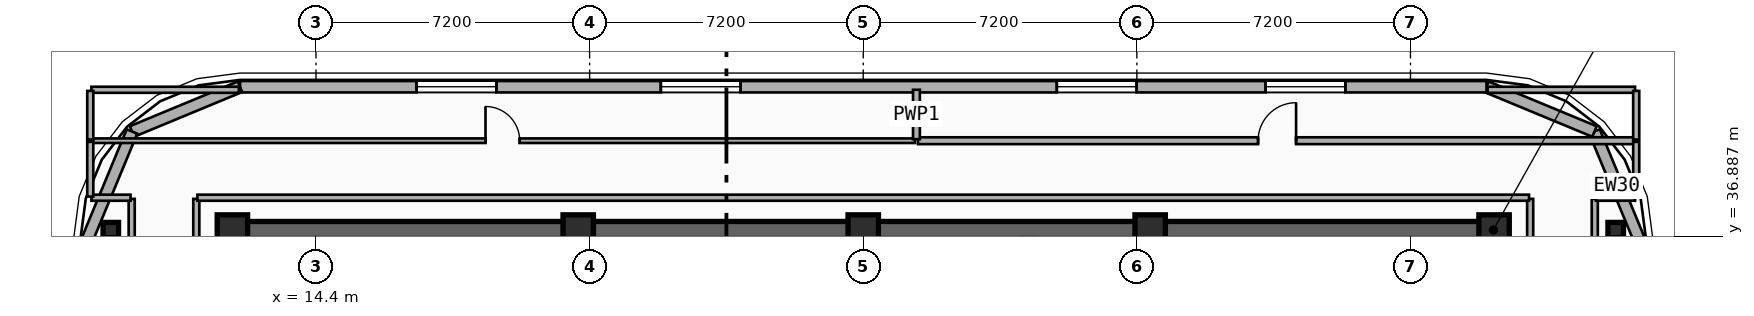
"""IFC4 building model, lengths in metres.
Left out: names, types, materials, properties, quantities, classifications, styles, units other than length and angle.
Written with IfcOpenShell. Run it as: python <this file> out.ifc"""

import sys

from ifc_helpers import new_model, si_unit, direction, frame, frame_2d, origin, origin_2d, place, context, subcontext, project, spatial, rectangle, i_section, extrude, element, fill, save


model = new_model("IFC4")
c1 = context("Model", 3, precision=1e-05, world=origin(), true_north=direction((0.0, 1.0)))
c2 = subcontext(c1, "Body", "Model", "MODEL_VIEW")
j1 = project(units=[si_unit("LENGTHUNIT", "METRE"), si_unit("PLANEANGLEUNIT", "RADIAN")], contexts=[c1])
p1 = place(None, origin())
s1 = spatial("IfcSite", under=j1, at=p1, CompositionType="ELEMENT")
p2 = place(p1, origin())
s2 = spatial("IfcBuilding", under=s1, at=p2, CompositionType="ELEMENT")
p3 = place(p2, frame((0.0, 0.0, 254.7)))
s3 = spatial("IfcBuildingStorey", under=s2, at=p3, CompositionType="ELEMENT", Elevation=254.7)
p4 = place(p3, frame((12.15, 37.05, 0.0), z_axis=(0.0, 0.0, 1.0), x_axis=(1.0, 0.0, 0.0)))
e1 = element("IfcWall", 1, at=p4, inside=s3, PredefinedType="SHEAR", context=c2, shape_type="SweptSolid", body=[
    extrude(rectangle(XDim=33.23, YDim=0.45, at=frame_2d((16.615, 0.0))), origin(), (0.0, 0.0, 1.0), 3.7),
])
for number, where, z_axis, x_axis in (
    (2, (12.2, 37.05, 0.0), (0.0, 0.0, 1.0), (1.0, 0.0, 0.0)),
    (3, (21.3, 37.05, 0.0), (0.0, 0.0, 1.0), (1.0, 0.0, 0.0)),
    (4, (28.8, 37.05, 0.0), (0.0, 0.0, 1.0), (1.0, 0.0, 0.0)),
    (5, (36.35, 37.05, 0.0), (0.0, 0.0, 1.0), (1.0, 0.0, 0.0)),
    (6, (45.4, 37.05, 0.0), (0.0, 0.0, 1.0), (1.0, 0.0, 0.0)),
):
    element("IfcColumn", number, at=place(p3, frame(where, z_axis=z_axis, x_axis=x_axis)), inside=s3, PredefinedType="COLUMN", context=c2, shape_type="SweptSolid", body=[
        extrude(rectangle(XDim=0.8, YDim=0.8, at=origin_2d()), origin(), (0.0, 0.0, 1.0), 3.7),
    ])
for number, where, z_axis, x_axis in (
    (7, (9.0, 37.05, 0.0), (0.0, 0.0, 1.0), (1.0, 0.0, 0.0)),
    (8, (48.6, 37.05, 0.0), (0.0, 0.0, 1.0), (1.0, 0.0, 0.0)),
):
    element("IfcColumn", number, at=place(p3, frame(where, z_axis=z_axis, x_axis=x_axis)), inside=s3, PredefinedType="COLUMN", context=c2, shape_type="SweptSolid", body=[
        extrude(i_section(OverallWidth=0.408, OverallDepth=0.4, WebThickness=0.025, FlangeThickness=0.039, FilletRadius=0.015, at=origin_2d()), origin(), (0.0, 0.0, 1.0), 3.7),
    ])
for number, where, z_axis, x_axis in (
    (9, (48.042, 39.643, 0.0), (0.0, 0.0, 1.0), (0.383, -0.924, 0.0)),
    (10, (45.2, 40.82, 0.0), (0.0, 0.0, 1.0), (0.924, -0.383, 0.0)),
):
    element("IfcWall", number, at=place(p3, frame(where, z_axis=z_axis, x_axis=x_axis)), inside=s3, PredefinedType="SOLIDWALL", context=c2, shape_type="SweptSolid", body=[
        extrude(rectangle(XDim=3.077, YDim=0.3, at=frame_2d((1.538, 0.0))), origin(), (0.0, 0.0, 1.0), 3.42),
    ])
p5 = place(p3, frame((12.4, 40.82, 0.0), z_axis=(0.0, 0.0, 1.0), x_axis=(1.0, 0.0, 0.0)))
e11 = element("IfcWall", 11, at=p5, inside=s3, PredefinedType="SOLIDWALL", context=c2, shape_type="SweptSolid", body=[
    extrude(rectangle(XDim=32.8, YDim=0.3, at=frame_2d((16.4, 0.0))), origin(), (0.0, 0.0, 1.0), 3.42),
])
p6 = place(p5, frame((4.647, 0.0, 0.75)))
e12 = element("IfcOpeningElement", 12, at=p6, cuts=e11, PredefinedType="OPENING", context=c2, shape_type="SweptSolid", body=[
    extrude(rectangle(XDim=2.1, YDim=2.1, at=frame_2d((1.05, 1.05))), frame((0.0, 0.16, 0.0), z_axis=(0.0, -1.0, 0.0), x_axis=(1.0, 0.0, 0.0)), (0.0, 0.0, 1.0), 0.32),
])
p7 = place(p5, frame((11.073, 0.0, 0.75)))
e13 = element("IfcOpeningElement", 13, at=p7, cuts=e11, PredefinedType="OPENING", context=c2, shape_type="SweptSolid", body=[
    extrude(rectangle(XDim=2.1, YDim=2.1, at=frame_2d((1.05, 1.05))), frame((0.0, 0.16, 0.0), z_axis=(0.0, -1.0, 0.0), x_axis=(1.0, 0.0, 0.0)), (0.0, 0.0, 1.0), 0.32),
])
p8 = place(p5, frame((21.493, 0.0, 0.75)))
e14 = element("IfcOpeningElement", 14, at=p8, cuts=e11, PredefinedType="OPENING", context=c2, shape_type="SweptSolid", body=[
    extrude(rectangle(XDim=2.1, YDim=2.1, at=frame_2d((1.05, 1.05))), frame((0.0, 0.16, 0.0), z_axis=(0.0, -1.0, 0.0), x_axis=(1.0, 0.0, 0.0)), (0.0, 0.0, 1.0), 0.32),
])
p9 = place(p5, frame((26.987, 0.0, 0.75)))
e15 = element("IfcOpeningElement", 15, at=p9, cuts=e11, PredefinedType="OPENING", context=c2, shape_type="SweptSolid", body=[
    extrude(rectangle(XDim=2.1, YDim=2.1, at=frame_2d((1.05, 1.05))), frame((0.0, 0.16, 0.0), z_axis=(0.0, -1.0, 0.0), x_axis=(1.0, 0.0, 0.0)), (0.0, 0.0, 1.0), 0.32),
])
for number, where, z_axis, x_axis in (
    (16, (9.557, 39.643, 0.0), (0.0, 0.0, 1.0), (0.924, 0.383, 0.0)),
    (17, (8.38, 36.8, 0.0), (0.0, 0.0, 1.0), (0.383, 0.924, 0.0)),
):
    element("IfcWall", number, at=place(p3, frame(where, z_axis=z_axis, x_axis=x_axis)), inside=s3, PredefinedType="SOLIDWALL", context=c2, shape_type="SweptSolid", body=[
        extrude(rectangle(XDim=3.077, YDim=0.3, at=frame_2d((1.538, 0.0))), origin(), (0.0, 0.0, 1.0), 3.42),
    ])
p10 = place(p3, frame((8.46, 39.4, 0.0), z_axis=(0.0, 0.0, 1.0), x_axis=(1.0, 0.0, 0.0)))
e18 = element("IfcWall", 18, at=p10, inside=s3, PredefinedType="PARTITIONING", context=c2, shape_type="SweptSolid", body=[
    extrude(rectangle(XDim=21.7, YDim=0.12, at=frame_2d((10.85, 0.0))), origin(), (0.0, 0.0, 1.0), 3.42),
])
p11 = place(p10, frame((10.4, 0.0, 0.0)))
e19 = element("IfcOpeningElement", 19, at=p11, cuts=e18, PredefinedType="OPENING", context=c2, shape_type="SweptSolid", body=[
    extrude(rectangle(XDim=0.9, YDim=2.1, at=frame_2d((0.45, 1.05))), frame((0.0, 0.07, 0.0), z_axis=(0.0, -1.0, 0.0), x_axis=(1.0, 0.0, 0.0)), (0.0, 0.0, 1.0), 0.14),
])
p12 = place(p3, frame((30.24, 39.4, 0.0), z_axis=(0.0, 0.0, 1.0), x_axis=(1.0, 0.0, 0.0)))
e20 = element("IfcWall", 20, at=p12, inside=s3, PredefinedType="PLUMBINGWALL", context=c2, shape_type="SweptSolid", body=[
    extrude(rectangle(XDim=18.9, YDim=0.18, at=frame_2d((9.45, 0.0))), origin(), (0.0, 0.0, 1.0), 3.42),
])
p13 = place(p12, frame((8.95, 0.0, 0.0)))
e21 = element("IfcOpeningElement", 21, at=p13, cuts=e20, PredefinedType="OPENING", context=c2, shape_type="SweptSolid", body=[
    extrude(rectangle(XDim=1.0, YDim=2.15, at=frame_2d((0.5, 1.075))), frame((0.0, 0.1, 0.0), z_axis=(0.0, -1.0, 0.0), x_axis=(1.0, 0.0, 0.0)), (0.0, 0.0, 1.0), 0.2),
])
p14 = place(p3, frame((30.2, 39.44, 0.0), z_axis=(0.0, 0.0, 1.0), x_axis=(0.0, 1.0, 0.0)))
e22 = element("IfcWall", 22, at=p14, inside=s3, PredefinedType="PLUMBINGWALL", context=c2, shape_type="SweptSolid", body=[
    extrude(rectangle(XDim=1.3, YDim=0.18, at=frame_2d((0.65, 0.0))), origin(), (0.0, 0.0, 1.0), 3.42),
])
for number, where, z_axis, x_axis in (
    (23, (9.55, 27.63, 0.0), (0.0, 0.0, 1.0), (0.0, 1.0, 0.0)),
    (24, (11.25, 27.63, 0.0), (0.0, 0.0, 1.0), (0.0, 1.0, 0.0)),
    (25, (46.35, 27.63, 0.0), (0.0, 0.0, 1.0), (0.0, 1.0, 0.0)),
    (26, (48.05, 27.63, 0.0), (0.0, 0.0, 1.0), (0.0, 1.0, 0.0)),
):
    element("IfcWall", number, at=place(p3, frame(where, z_axis=z_axis, x_axis=x_axis)), inside=s3, PredefinedType="PARTITIONING", context=c2, shape_type="SweptSolid", body=[
        extrude(rectangle(XDim=10.24, YDim=0.16, at=frame_2d((5.12, 0.0))), origin(), (0.0, 0.0, 1.0), 2.9),
    ])
p15 = place(p3, frame((8.49, 37.9, 0.0), z_axis=(0.0, 0.0, 1.0), x_axis=(1.0, 0.0, 0.0)))
e27 = element("IfcWall", 27, at=p15, inside=s3, PredefinedType="PARTITIONING", context=c2, shape_type="SweptSolid", body=[
    extrude(rectangle(XDim=1.03, YDim=0.16, at=frame_2d((0.515, 0.0))), origin(), (0.0, 0.0, 1.0), 3.42),
])
p16 = place(p3, frame((11.28, 37.9, 0.0), z_axis=(0.0, 0.0, 1.0), x_axis=(1.0, 0.0, 0.0)))
e28 = element("IfcWall", 28, at=p16, inside=s3, PredefinedType="PARTITIONING", context=c2, shape_type="SweptSolid", body=[
    extrude(rectangle(XDim=35.04, YDim=0.16, at=frame_2d((17.52, 0.0))), origin(), (0.0, 0.0, 1.0), 3.42),
])
p17 = place(p3, frame((48.08, 37.9, 0.0), z_axis=(0.0, 0.0, 1.0), x_axis=(1.0, 0.0, 0.0)))
e29 = element("IfcWall", 29, at=p17, inside=s3, PredefinedType="PARTITIONING", context=c2, shape_type="SweptSolid", body=[
    extrude(rectangle(XDim=1.03, YDim=0.16, at=frame_2d((0.515, 0.0))), origin(), (0.0, 0.0, 1.0), 3.42),
])
for number, where, z_axis, x_axis in (
    (30, (8.46, 37.93, 0.0), (0.0, 0.0, 1.0), (0.0, 1.0, 0.0)),
    (31, (49.14, 37.93, 0.0), (0.0, 0.0, 1.0), (0.0, 1.0, 0.0)),
):
    element("IfcWall", number, at=place(p3, frame(where, z_axis=z_axis, x_axis=x_axis)), inside=s3, PredefinedType="PARTITIONING", context=c2, shape_type="SweptSolid", body=[
        extrude(rectangle(XDim=1.44, YDim=0.16, at=frame_2d((0.72, 0.0))), origin(), (0.0, 0.0, 1.0), 3.42),
    ])
p18 = place(p3, frame((8.49, 40.74, 0.0), z_axis=(0.0, 0.0, 1.0), x_axis=(1.0, 0.0, 0.0)))
e32 = element("IfcWall", 32, at=p18, inside=s3, PredefinedType="PARTITIONING", context=c2, shape_type="SweptSolid", body=[
    extrude(rectangle(XDim=3.88, YDim=0.16, at=frame_2d((1.94, 0.0))), origin(), (0.0, 0.0, 1.0), 3.42),
])
p19 = place(p3, frame((8.46, 39.43, 0.0), z_axis=(0.0, 0.0, 1.0), x_axis=(0.0, 1.0, 0.0)))
e33 = element("IfcWall", 33, at=p19, inside=s3, PredefinedType="PARTITIONING", context=c2, shape_type="SweptSolid", body=[
    extrude(rectangle(XDim=1.28, YDim=0.16, at=frame_2d((0.64, 0.0))), origin(), (0.0, 0.0, 1.0), 3.42),
])
p20 = place(p3, frame((45.23, 40.74, 0.0), z_axis=(0.0, 0.0, 1.0), x_axis=(1.0, 0.0, 0.0)))
e34 = element("IfcWall", 34, at=p20, inside=s3, PredefinedType="PARTITIONING", context=c2, shape_type="SweptSolid", body=[
    extrude(rectangle(XDim=3.88, YDim=0.16, at=frame_2d((1.94, 0.0))), origin(), (0.0, 0.0, 1.0), 3.42),
])
p21 = place(p3, frame((49.14, 39.43, 0.0), z_axis=(0.0, 0.0, 1.0), x_axis=(0.0, 1.0, 0.0)))
e35 = element("IfcWall", 35, at=p21, inside=s3, PredefinedType="PARTITIONING", context=c2, shape_type="SweptSolid", body=[
    extrude(rectangle(XDim=1.28, YDim=0.16, at=frame_2d((0.64, 0.0))), origin(), (0.0, 0.0, 1.0), 3.42),
])
p22 = place(p6, origin())
e36 = element("IfcWindow", 36, at=p22, inside=s3, PartitioningType="SINGLE_PANEL", PredefinedType="WINDOW", context=c2, shape_type="SweptSolid", body=[
    extrude(rectangle(XDim=2.1, YDim=2.1, at=frame_2d((1.05, 1.05))), frame((0.0, 0.03, 0.0), z_axis=(0.0, -1.0, 0.0), x_axis=(1.0, 0.0, 0.0)), (0.0, 0.0, 1.0), 0.06),
])
fill(e12, e36)
p23 = place(p7, origin())
e37 = element("IfcWindow", 37, at=p23, inside=s3, PartitioningType="SINGLE_PANEL", PredefinedType="WINDOW", context=c2, shape_type="SweptSolid", body=[
    extrude(rectangle(XDim=2.1, YDim=2.1, at=frame_2d((1.05, 1.05))), frame((0.0, 0.03, 0.0), z_axis=(0.0, -1.0, 0.0), x_axis=(1.0, 0.0, 0.0)), (0.0, 0.0, 1.0), 0.06),
])
fill(e13, e37)
p24 = place(p8, origin())
e38 = element("IfcWindow", 38, at=p24, inside=s3, PartitioningType="SINGLE_PANEL", PredefinedType="WINDOW", context=c2, shape_type="SweptSolid", body=[
    extrude(rectangle(XDim=2.1, YDim=2.1, at=frame_2d((1.05, 1.05))), frame((0.0, 0.03, 0.0), z_axis=(0.0, -1.0, 0.0), x_axis=(1.0, 0.0, 0.0)), (0.0, 0.0, 1.0), 0.06),
])
fill(e14, e38)
p25 = place(p9, origin())
e39 = element("IfcWindow", 39, at=p25, inside=s3, PartitioningType="SINGLE_PANEL", PredefinedType="WINDOW", context=c2, shape_type="SweptSolid", body=[
    extrude(rectangle(XDim=2.1, YDim=2.1, at=frame_2d((1.05, 1.05))), frame((0.0, 0.03, 0.0), z_axis=(0.0, -1.0, 0.0), x_axis=(1.0, 0.0, 0.0)), (0.0, 0.0, 1.0), 0.06),
])
fill(e15, e39)
p26 = place(p11, origin())
e40 = element("IfcDoor", 40, at=p26, inside=s3, OperationType="SINGLE_SWING_LEFT", PredefinedType="DOOR", context=c2, shape_type="SweptSolid", body=[
    extrude(rectangle(XDim=0.9, YDim=2.1, at=frame_2d((0.45, 1.05))), frame((0.0, 0.025, 0.0), z_axis=(0.0, -1.0, 0.0), x_axis=(1.0, 0.0, 0.0)), (0.0, 0.0, 1.0), 0.05),
])
fill(e19, e40)
p27 = place(p13, origin())
e41 = element("IfcDoor", 41, at=p27, inside=s3, OperationType="SINGLE_SWING_RIGHT", PredefinedType="DOOR", context=c2, shape_type="SweptSolid", body=[
    extrude(rectangle(XDim=1.0, YDim=2.15, at=frame_2d((0.5, 1.075))), frame((0.0, 0.025, 0.0), z_axis=(0.0, -1.0, 0.0), x_axis=(1.0, 0.0, 0.0)), (0.0, 0.0, 1.0), 0.05),
])
fill(e21, e41)
save(model, sys.argv[1])
